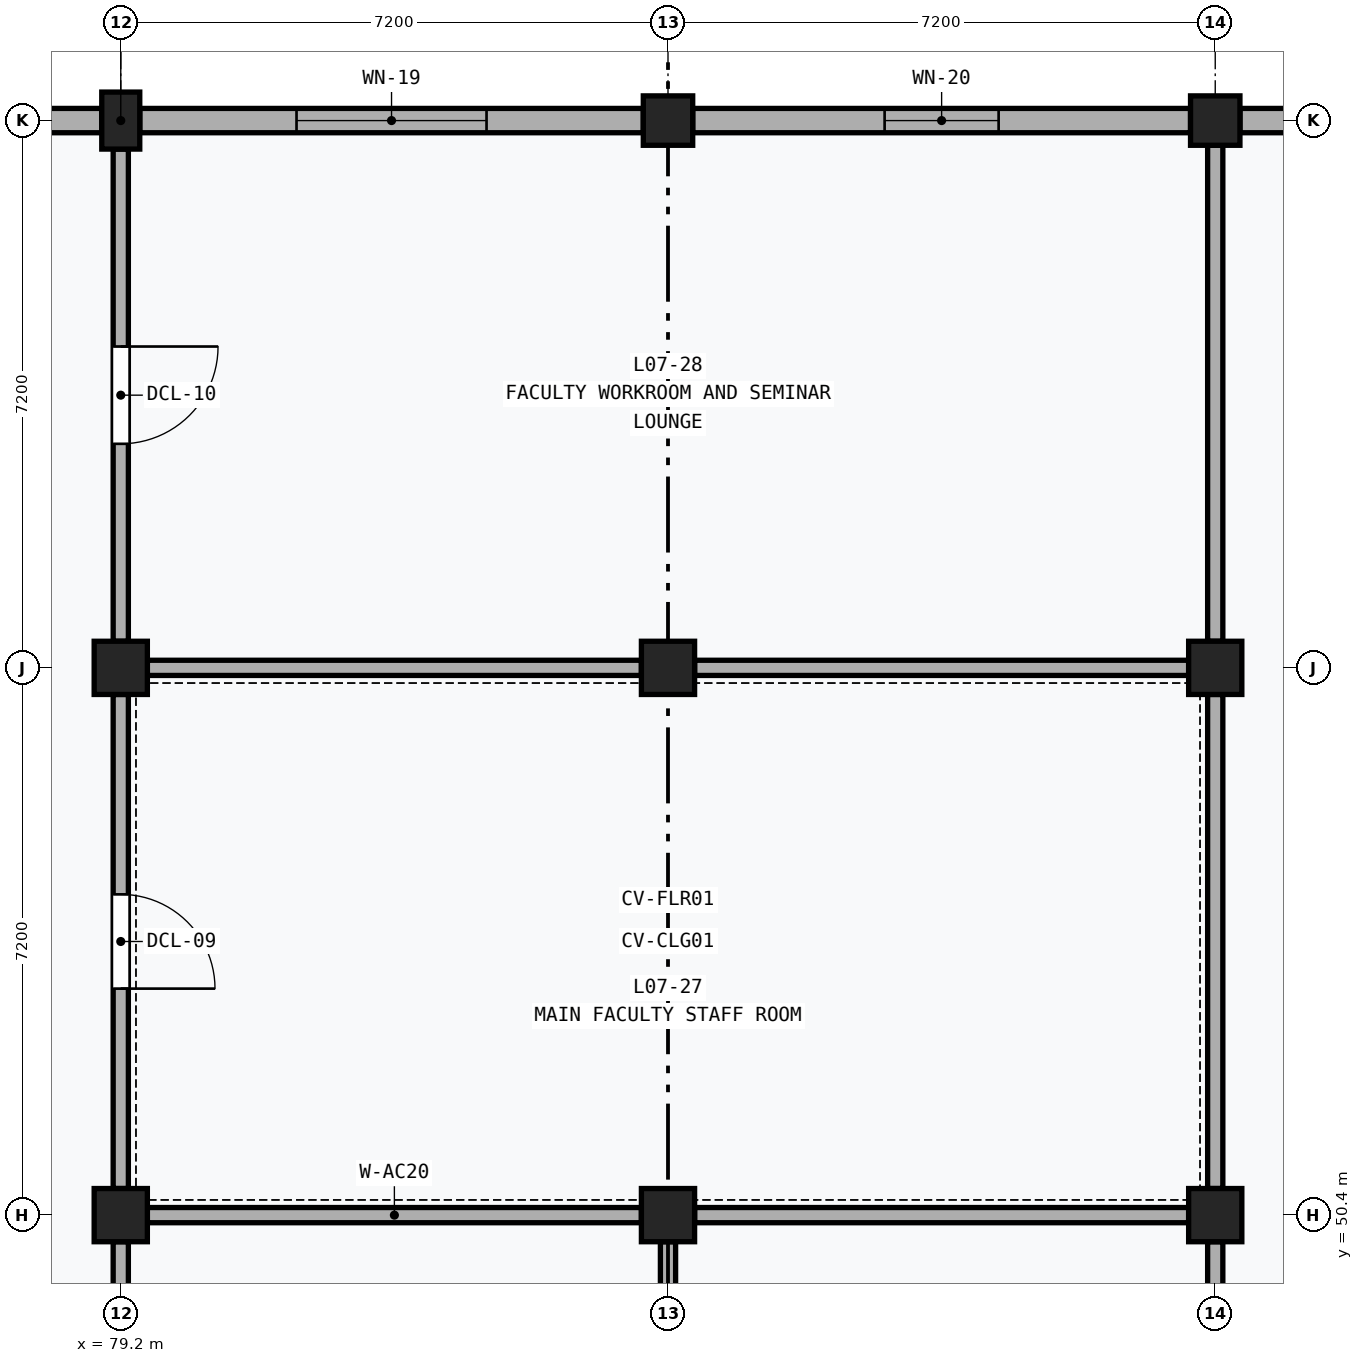
"""IFC4 building model, lengths in metres.
Left out: names, types, materials, properties, quantities, classifications, styles, units other than length and angle.
Written with IfcOpenShell. Run it as: python <this file> out.ifc"""

import sys

from ifc_helpers import new_model, si_unit, direction, frame, frame_2d, origin, origin_2d, place, context, subcontext, project, spatial, rectangle, extrude, element, fill, save


model = new_model("IFC4")
c1 = context("Model", 3, precision=1e-05, world=origin(), true_north=direction((0.0, 1.0)))
c2 = subcontext(c1, "Body", "Model", "MODEL_VIEW")
j1 = project(units=[si_unit("LENGTHUNIT", "METRE"), si_unit("PLANEANGLEUNIT", "RADIAN")], contexts=[c1])
p1 = place(None, origin())
s1 = spatial("IfcSite", under=j1, at=p1, CompositionType="ELEMENT")
p2 = place(p1, origin())
s2 = spatial("IfcBuilding", under=s1, at=p2, CompositionType="ELEMENT")
p3 = place(p2, frame((0.0, 0.0, 30.6)))
s3 = spatial("IfcBuildingStorey", under=s2, at=p3, CompositionType="ELEMENT", Elevation=30.6)
for number, where, z_axis, x_axis in (
    (1, (79.2, 50.4, 0.0), (0.0, 0.0, 1.0), (1.0, 0.0, 0.0)),
    (2, (79.2, 57.6, 0.0), (0.0, 0.0, 1.0), (1.0, 0.0, 0.0)),
):
    element("IfcColumn", number, at=place(p3, frame(where, z_axis=z_axis, x_axis=x_axis)), inside=s3, PredefinedType="COLUMN", context=c2, shape_type="SweptSolid", body=[
        extrude(rectangle(XDim=0.7, YDim=0.7, at=origin_2d()), origin(), (0.0, 0.0, 1.0), 4.2),
    ])
p4 = place(p3, frame((79.2, 64.8, 0.0), z_axis=(0.0, 0.0, 1.0), x_axis=(1.0, 0.0, 0.0)))
e3 = element("IfcColumn", 3, at=p4, inside=s3, PredefinedType="PILASTER", context=c2, shape_type="SweptSolid", body=[
    extrude(rectangle(XDim=0.5, YDim=0.75, at=origin_2d()), origin(), (0.0, 0.0, 1.0), 4.2),
])
for number, where, z_axis, x_axis in (
    (4, (86.4, 50.4, 0.0), (0.0, 0.0, 1.0), (1.0, 0.0, 0.0)),
    (5, (86.4, 57.6, 0.0), (0.0, 0.0, 1.0), (1.0, 0.0, 0.0)),
):
    element("IfcColumn", number, at=place(p3, frame(where, z_axis=z_axis, x_axis=x_axis)), inside=s3, PredefinedType="COLUMN", context=c2, shape_type="SweptSolid", body=[
        extrude(rectangle(XDim=0.7, YDim=0.7, at=origin_2d()), origin(), (0.0, 0.0, 1.0), 4.2),
    ])
p5 = place(p3, frame((86.4, 64.8, 0.0), z_axis=(0.0, 0.0, 1.0), x_axis=(1.0, 0.0, 0.0)))
e6 = element("IfcColumn", 6, at=p5, inside=s3, PredefinedType="COLUMN", context=c2, shape_type="SweptSolid", body=[
    extrude(rectangle(XDim=0.65, YDim=0.65, at=origin_2d()), origin(), (0.0, 0.0, 1.0), 4.2),
])
for number, where, z_axis, x_axis in (
    (7, (93.6, 50.4, 0.0), (0.0, 0.0, 1.0), (1.0, 0.0, 0.0)),
    (8, (93.6, 57.6, 0.0), (0.0, 0.0, 1.0), (1.0, 0.0, 0.0)),
):
    element("IfcColumn", number, at=place(p3, frame(where, z_axis=z_axis, x_axis=x_axis)), inside=s3, PredefinedType="COLUMN", context=c2, shape_type="SweptSolid", body=[
        extrude(rectangle(XDim=0.7, YDim=0.7, at=origin_2d()), origin(), (0.0, 0.0, 1.0), 4.2),
    ])
p6 = place(p3, frame((93.6, 64.8, 0.0), z_axis=(0.0, 0.0, 1.0), x_axis=(1.0, 0.0, 0.0)))
e9 = element("IfcColumn", 9, at=p6, inside=s3, PredefinedType="COLUMN", context=c2, shape_type="SweptSolid", body=[
    extrude(rectangle(XDim=0.65, YDim=0.65, at=origin_2d()), origin(), (0.0, 0.0, 1.0), 4.2),
])
p7 = place(p3, frame((72.325, 64.8, 0.0), z_axis=(0.0, 0.0, 1.0), x_axis=(1.0, 0.0, 0.0)))
e10 = element("IfcWall", 10, at=p7, inside=s3, PredefinedType="SOLIDWALL", context=c2, shape_type="SweptSolid", body=[
    extrude(rectangle(XDim=6.625, YDim=0.32, at=frame_2d((3.312, 0.0))), origin(), (0.0, 0.0, 1.0), 3.25),
])
p8 = place(p7, frame((2.212, 0.0, 1.1)))
e11 = element("IfcOpeningElement", 11, at=p8, cuts=e10, PredefinedType="OPENING", context=c2, shape_type="SweptSolid", body=[
    extrude(rectangle(XDim=2.2, YDim=1.5, at=frame_2d((1.1, 0.75))), frame((0.0, 0.172, 0.0), z_axis=(0.0, -1.0, 0.0), x_axis=(1.0, 0.0, 0.0)), (0.0, 0.0, 1.0), 0.344),
])
p9 = place(p3, frame((79.45, 64.8, 0.0), z_axis=(0.0, 0.0, 1.0), x_axis=(1.0, 0.0, 0.0)))
e12 = element("IfcWall", 12, at=p9, inside=s3, PredefinedType="SOLIDWALL", context=c2, shape_type="SweptSolid", body=[
    extrude(rectangle(XDim=6.625, YDim=0.32, at=frame_2d((3.312, 0.0))), origin(), (0.0, 0.0, 1.0), 3.25),
])
p10 = place(p9, frame((2.062, 0.0, 1.1)))
e13 = element("IfcOpeningElement", 13, at=p10, cuts=e12, PredefinedType="OPENING", context=c2, shape_type="SweptSolid", body=[
    extrude(rectangle(XDim=2.5, YDim=1.5, at=frame_2d((1.25, 0.75))), frame((0.0, 0.172, 0.0), z_axis=(0.0, -1.0, 0.0), x_axis=(1.0, 0.0, 0.0)), (0.0, 0.0, 1.0), 0.344),
])
p11 = place(p3, frame((86.725, 64.8, 0.0), z_axis=(0.0, 0.0, 1.0), x_axis=(1.0, 0.0, 0.0)))
e14 = element("IfcWall", 14, at=p11, inside=s3, PredefinedType="SOLIDWALL", context=c2, shape_type="SweptSolid", body=[
    extrude(rectangle(XDim=6.55, YDim=0.32, at=frame_2d((3.275, 0.0))), origin(), (0.0, 0.0, 1.0), 3.25),
])
p12 = place(p11, frame((2.525, 0.0, 1.2)))
e15 = element("IfcOpeningElement", 15, at=p12, cuts=e14, PredefinedType="OPENING", context=c2, shape_type="SweptSolid", body=[
    extrude(rectangle(XDim=1.5, YDim=1.35, at=frame_2d((0.75, 0.675))), frame((0.0, 0.172, 0.0), z_axis=(0.0, -1.0, 0.0), x_axis=(1.0, 0.0, 0.0)), (0.0, 0.0, 1.0), 0.344),
])
p13 = place(p3, frame((93.925, 64.8, 0.0), z_axis=(0.0, 0.0, 1.0), x_axis=(1.0, 0.0, 0.0)))
e16 = element("IfcWall", 16, at=p13, inside=s3, PredefinedType="SOLIDWALL", context=c2, shape_type="SweptSolid", body=[
    extrude(rectangle(XDim=6.55, YDim=0.32, at=frame_2d((3.275, 0.0))), origin(), (0.0, 0.0, 1.0), 3.25),
])
p14 = place(p13, frame((2.4, 0.0, 1.2)))
e17 = element("IfcOpeningElement", 17, at=p14, cuts=e16, PredefinedType="OPENING", context=c2, shape_type="SweptSolid", body=[
    extrude(rectangle(XDim=1.75, YDim=1.35, at=frame_2d((0.875, 0.675))), frame((0.0, 0.172, 0.0), z_axis=(0.0, -1.0, 0.0), x_axis=(1.0, 0.0, 0.0)), (0.0, 0.0, 1.0), 0.344),
])
for number, where, z_axis, x_axis in (
    (18, (79.55, 50.4, 0.0), (0.0, 0.0, 1.0), (1.0, 0.0, 0.0)),
    (19, (79.55, 57.6, 0.0), (0.0, 0.0, 1.0), (1.0, 0.0, 0.0)),
):
    element("IfcWall", number, at=place(p3, frame(where, z_axis=z_axis, x_axis=x_axis)), inside=s3, PredefinedType="PARTITIONING", context=c2, shape_type="SweptSolid", body=[
        extrude(rectangle(XDim=6.5, YDim=0.2, at=frame_2d((3.25, 0.0))), origin(), (0.0, 0.0, 1.0), 3.11),
    ])
p15 = place(p3, frame((79.2, 50.75, 0.0), z_axis=(0.0, 0.0, 1.0), x_axis=(0.0, 1.0, 0.0)))
e20 = element("IfcWall", 20, at=p15, inside=s3, PredefinedType="PARTITIONING", context=c2, shape_type="SweptSolid", body=[
    extrude(rectangle(XDim=6.5, YDim=0.2, at=frame_2d((3.25, 0.0))), origin(), (0.0, 0.0, 1.0), 3.11),
])
p16 = place(p15, frame((2.63, 0.0, 0.0)))
e21 = element("IfcOpeningElement", 21, at=p16, cuts=e20, PredefinedType="OPENING", context=c2, shape_type="SweptSolid", body=[
    extrude(rectangle(XDim=1.24, YDim=2.26, at=frame_2d((0.62, 1.13))), frame((0.0, 0.112, 0.0), z_axis=(0.0, -1.0, 0.0), x_axis=(1.0, 0.0, 0.0)), (0.0, 0.0, 1.0), 0.224),
])
p17 = place(p3, frame((86.75, 50.4, 0.0), z_axis=(0.0, 0.0, 1.0), x_axis=(1.0, 0.0, 0.0)))
e22 = element("IfcWall", 22, at=p17, inside=s3, PredefinedType="PARTITIONING", context=c2, shape_type="SweptSolid", body=[
    extrude(rectangle(XDim=6.5, YDim=0.2, at=frame_2d((3.25, 0.0))), origin(), (0.0, 0.0, 1.0), 3.11),
])
p18 = place(p3, frame((86.75, 57.6, 0.0), z_axis=(0.0, 0.0, 1.0), x_axis=(1.0, 0.0, 0.0)))
e23 = element("IfcWall", 23, at=p18, inside=s3, PredefinedType="PARTITIONING", context=c2, shape_type="SweptSolid", body=[
    extrude(rectangle(XDim=6.5, YDim=0.2, at=frame_2d((3.25, 0.0))), origin(), (0.0, 0.0, 1.0), 3.18),
])
p19 = place(p3, frame((93.6, 50.75, 0.0), z_axis=(0.0, 0.0, 1.0), x_axis=(0.0, 1.0, 0.0)))
e24 = element("IfcWall", 24, at=p19, inside=s3, PredefinedType="PARTITIONING", context=c2, shape_type="SweptSolid", body=[
    extrude(rectangle(XDim=6.5, YDim=0.2, at=frame_2d((3.25, 0.0))), origin(), (0.0, 0.0, 1.0), 3.11),
])
p20 = place(p3, frame((79.2, 57.95, 0.0), z_axis=(0.0, 0.0, 1.0), x_axis=(0.0, 1.0, 0.0)))
e25 = element("IfcWall", 25, at=p20, inside=s3, PredefinedType="PARTITIONING", context=c2, shape_type="SweptSolid", body=[
    extrude(rectangle(XDim=6.475, YDim=0.2, at=frame_2d((3.238, 0.0))), origin(), (0.0, 0.0, 1.0), 3.11),
])
p21 = place(p20, frame((2.597, 0.0, 0.0)))
e26 = element("IfcOpeningElement", 26, at=p21, cuts=e25, PredefinedType="OPENING", context=c2, shape_type="SweptSolid", body=[
    extrude(rectangle(XDim=1.28, YDim=2.28, at=frame_2d((0.64, 1.14))), frame((0.0, 0.112, 0.0), z_axis=(0.0, -1.0, 0.0), x_axis=(1.0, 0.0, 0.0)), (0.0, 0.0, 1.0), 0.224),
])
p22 = place(p3, frame((93.6, 57.95, 0.0), z_axis=(0.0, 0.0, 1.0), x_axis=(0.0, 1.0, 0.0)))
e27 = element("IfcWall", 27, at=p22, inside=s3, PredefinedType="PARTITIONING", context=c2, shape_type="SweptSolid", body=[
    extrude(rectangle(XDim=6.525, YDim=0.2, at=frame_2d((3.263, 0.0))), origin(), (0.0, 0.0, 1.0), 3.11),
])
for number, where, z_axis, x_axis in (
    (28, (79.2, 43.55, 0.0), (0.0, 0.0, 1.0), (0.0, 1.0, 0.0)),
    (29, (86.4, 43.55, 0.0), (0.0, 0.0, 1.0), (0.0, 1.0, 0.0)),
    (30, (93.6, 43.55, 0.0), (0.0, 0.0, 1.0), (0.0, 1.0, 0.0)),
):
    element("IfcWall", number, at=place(p3, frame(where, z_axis=z_axis, x_axis=x_axis)), inside=s3, PredefinedType="PARTITIONING", context=c2, shape_type="SweptSolid", body=[
        extrude(rectangle(XDim=6.5, YDim=0.2, at=frame_2d((3.25, 0.0))), origin(), (0.0, 0.0, 1.0), 3.11),
    ])
p23 = place(p10, origin())
e31 = element("IfcWindow", 31, at=p23, inside=s3, PartitioningType="SINGLE_PANEL", PredefinedType="WINDOW", context=c2, shape_type="SweptSolid", body=[
    extrude(rectangle(XDim=2.5, YDim=1.5, at=frame_2d((1.25, 0.75))), frame((0.0, 0.03, 0.0), z_axis=(0.0, -1.0, 0.0), x_axis=(1.0, 0.0, 0.0)), (0.0, 0.0, 1.0), 0.06),
])
fill(e13, e31)
p24 = place(p12, origin())
e32 = element("IfcWindow", 32, at=p24, inside=s3, PartitioningType="SINGLE_PANEL", PredefinedType="WINDOW", context=c2, shape_type="SweptSolid", body=[
    extrude(rectangle(XDim=1.5, YDim=1.35, at=frame_2d((0.75, 0.675))), frame((0.0, 0.03, 0.0), z_axis=(0.0, -1.0, 0.0), x_axis=(1.0, 0.0, 0.0)), (0.0, 0.0, 1.0), 0.06),
])
fill(e15, e32)
p25 = place(p16, frame((1.24, 0.0, 0.0), z_axis=(0.0, 0.0, 1.0), x_axis=(-1.0, 0.0, 0.0)))
e33 = element("IfcDoor", 33, at=p25, inside=s3, OperationType="SINGLE_SWING_RIGHT", PredefinedType="DOOR", context=c2, shape_type="SweptSolid", body=[
    extrude(rectangle(XDim=1.24, YDim=2.26, at=frame_2d((0.62, 1.13))), frame((0.0, 0.025, 0.0), z_axis=(0.0, -1.0, 0.0), x_axis=(1.0, 0.0, 0.0)), (0.0, 0.0, 1.0), 0.05),
])
fill(e21, e33)
p26 = place(p21, frame((1.28, 0.0, 0.0), z_axis=(0.0, 0.0, 1.0), x_axis=(-1.0, 0.0, 0.0)))
e34 = element("IfcDoor", 34, at=p26, inside=s3, OperationType="SINGLE_SWING_LEFT", PredefinedType="DOOR", context=c2, shape_type="SweptSolid", body=[
    extrude(rectangle(XDim=1.28, YDim=2.28, at=frame_2d((0.64, 1.14))), frame((0.0, 0.025, 0.0), z_axis=(0.0, -1.0, 0.0), x_axis=(1.0, 0.0, 0.0)), (0.0, 0.0, 1.0), 0.05),
])
fill(e26, e34)
save(model, sys.argv[1])
